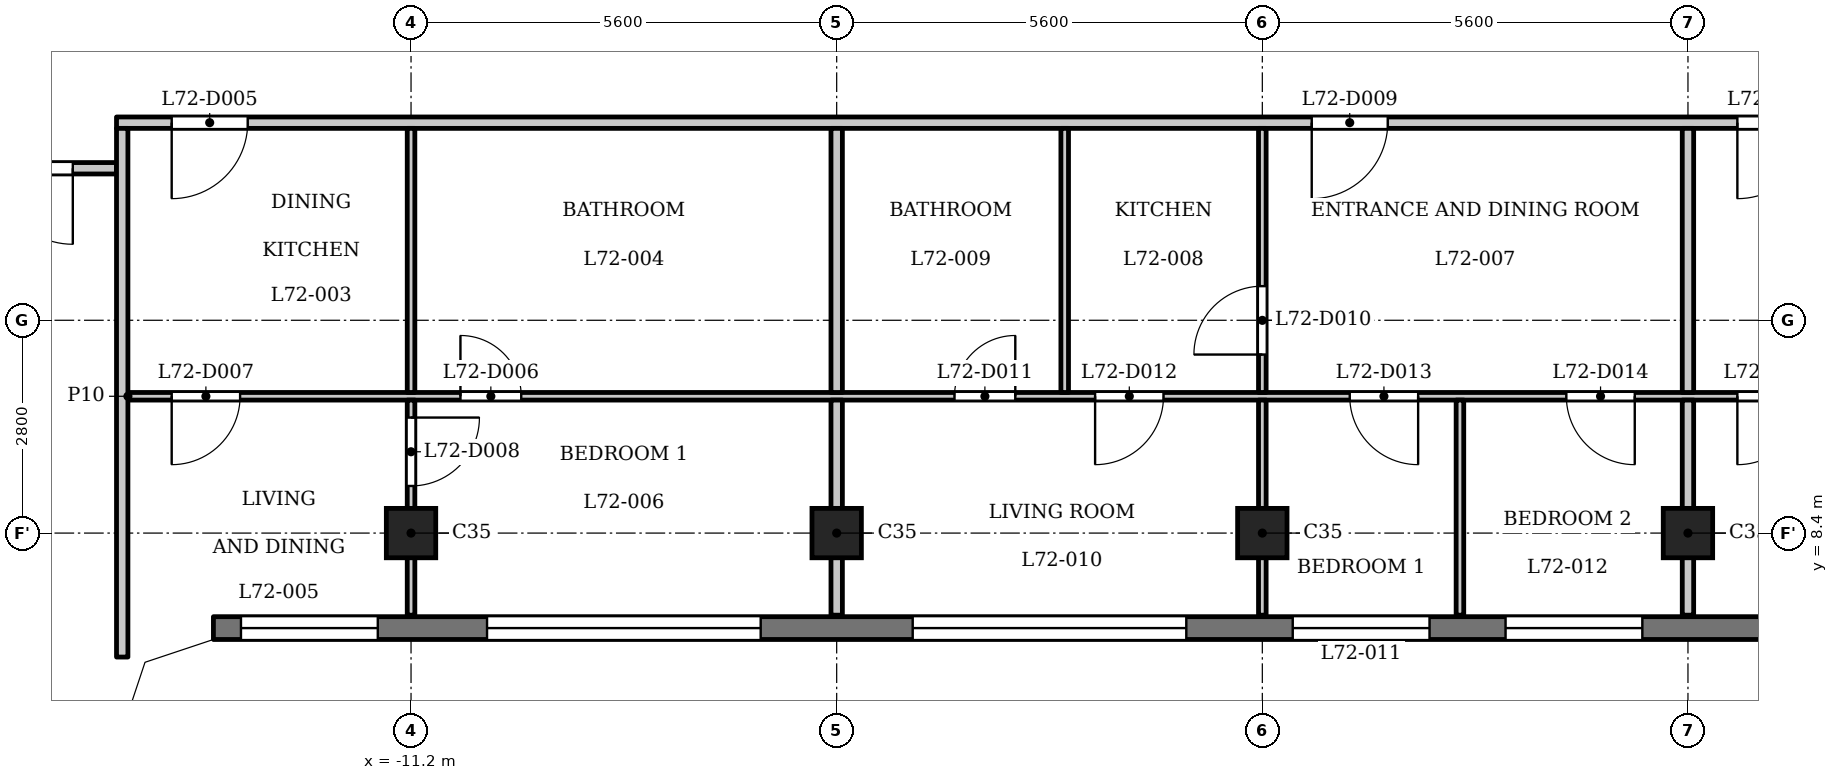
"""IFC4 building model, lengths in metres.
Left out: names, types, materials, properties, quantities, classifications, styles, units other than length and angle.
Written with IfcOpenShell. Run it as: python <this file> out.ifc"""

import sys

from ifc_helpers import new_model, si_unit, direction, frame, frame_2d, origin, origin_2d, place, context, subcontext, project, spatial, polyline, rectangle, outline, extrude, element, fill, save


model = new_model("IFC4")
c1 = context("Model", 3, precision=1e-05, world=origin(), true_north=direction((0.0, 1.0)))
c2 = subcontext(c1, "Body", "Model", "MODEL_VIEW")
j1 = project(units=[si_unit("LENGTHUNIT", "METRE"), si_unit("PLANEANGLEUNIT", "RADIAN")], contexts=[c1])
p1 = place(None, origin())
s1 = spatial("IfcSite", under=j1, at=p1, CompositionType="ELEMENT")
p2 = place(p1, origin())
s2 = spatial("IfcBuilding", under=s1, at=p2, CompositionType="ELEMENT")
p3 = place(p2, frame((0.0, 0.0, 276.7)))
s3 = spatial("IfcBuildingStorey", under=s2, at=p3, CompositionType="ELEMENT", Elevation=276.7)
for number, where, z_axis, x_axis in (
    (1, (-11.2, 8.4, 0.0), (0.0, 0.0, 1.0), (1.0, 0.0, 0.0)),
    (2, (-5.6, 8.4, 0.0), (0.0, 0.0, 1.0), (1.0, 0.0, 0.0)),
    (3, (0.0, 8.4, 0.0), (0.0, 0.0, 1.0), (1.0, 0.0, 0.0)),
    (4, (5.6, 8.4, 0.0), (0.0, 0.0, 1.0), (1.0, 0.0, 0.0)),
):
    element("IfcColumn", number, at=place(p3, frame(where, z_axis=z_axis, x_axis=x_axis)), inside=s3, PredefinedType="COLUMN", context=c2, shape_type="SweptSolid", body=[
        extrude(rectangle(XDim=0.65, YDim=0.65, at=origin_2d()), origin(), (0.0, 0.0, 1.0), 3.5),
    ])
p4 = place(p3, frame((-13.8, 7.15, 0.0), z_axis=(0.0, 0.0, 1.0), x_axis=(1.0, 0.0, 0.0)))
e5 = element("IfcWall", 5, at=p4, inside=s3, PredefinedType="SOLIDWALL", context=c2, shape_type="SweptSolid", body=[
    extrude(rectangle(XDim=27.6, YDim=0.3, at=frame_2d((13.8, 0.0))), origin(), (0.0, 0.0, 1.0), 3.2),
])
p5 = place(p4, frame((0.363, 0.0, 0.9)))
e6 = element("IfcOpeningElement", 6, at=p5, cuts=e5, PredefinedType="OPENING", context=c2, shape_type="SweptSolid", body=[
    extrude(rectangle(XDim=1.8, YDim=1.25, at=frame_2d((0.9, 0.625))), frame((0.0, 0.16, 0.0), z_axis=(0.0, -1.0, 0.0), x_axis=(1.0, 0.0, 0.0)), (0.0, 0.0, 1.0), 0.32),
])
p6 = place(p4, frame((3.6, 0.0, 1.2)))
e7 = element("IfcOpeningElement", 7, at=p6, cuts=e5, PredefinedType="OPENING", context=c2, shape_type="SweptSolid", body=[
    extrude(rectangle(XDim=3.6, YDim=0.95, at=frame_2d((1.8, 0.475))), frame((0.0, 0.16, 0.0), z_axis=(0.0, -1.0, 0.0), x_axis=(1.0, 0.0, 0.0)), (0.0, 0.0, 1.0), 0.32),
])
p7 = place(p4, frame((9.2, 0.0, 1.2)))
e8 = element("IfcOpeningElement", 8, at=p7, cuts=e5, PredefinedType="OPENING", context=c2, shape_type="SweptSolid", body=[
    extrude(rectangle(XDim=3.6, YDim=0.95, at=frame_2d((1.8, 0.475))), frame((0.0, 0.16, 0.0), z_axis=(0.0, -1.0, 0.0), x_axis=(1.0, 0.0, 0.0)), (0.0, 0.0, 1.0), 0.32),
])
p8 = place(p4, frame((14.2, 0.0, 0.9)))
e9 = element("IfcOpeningElement", 9, at=p8, cuts=e5, PredefinedType="OPENING", context=c2, shape_type="SweptSolid", body=[
    extrude(rectangle(XDim=1.8, YDim=1.25, at=frame_2d((0.9, 0.625))), frame((0.0, 0.16, 0.0), z_axis=(0.0, -1.0, 0.0), x_axis=(1.0, 0.0, 0.0)), (0.0, 0.0, 1.0), 0.32),
])
p9 = place(p4, frame((17.0, 0.0, 0.9)))
e10 = element("IfcOpeningElement", 10, at=p9, cuts=e5, PredefinedType="OPENING", context=c2, shape_type="SweptSolid", body=[
    extrude(rectangle(XDim=1.8, YDim=1.25, at=frame_2d((0.9, 0.625))), frame((0.0, 0.16, 0.0), z_axis=(0.0, -1.0, 0.0), x_axis=(1.0, 0.0, 0.0)), (0.0, 0.0, 1.0), 0.32),
])
p10 = place(p4, frame((20.4, 0.0, 1.2)))
e11 = element("IfcOpeningElement", 11, at=p10, cuts=e5, PredefinedType="OPENING", context=c2, shape_type="SweptSolid", body=[
    extrude(rectangle(XDim=3.6, YDim=0.95, at=frame_2d((1.8, 0.475))), frame((0.0, 0.16, 0.0), z_axis=(0.0, -1.0, 0.0), x_axis=(1.0, 0.0, 0.0)), (0.0, 0.0, 1.0), 0.32),
])
p11 = place(p4, frame((25.438, 0.0, 0.9)))
e12 = element("IfcOpeningElement", 12, at=p11, cuts=e5, PredefinedType="OPENING", context=c2, shape_type="SweptSolid", body=[
    extrude(rectangle(XDim=1.8, YDim=1.25, at=frame_2d((0.9, 0.625))), frame((0.0, 0.16, 0.0), z_axis=(0.0, -1.0, 0.0), x_axis=(1.0, 0.0, 0.0)), (0.0, 0.0, 1.0), 0.32),
])
p12 = place(p3, frame((-14.925, 10.2, 0.0), z_axis=(0.0, 0.0, 1.0), x_axis=(1.0, 0.0, 0.0)))
e13 = element("IfcWall", 13, at=p12, inside=s3, PredefinedType="PARTITIONING", context=c2, shape_type="SweptSolid", body=[
    extrude(rectangle(XDim=29.85, YDim=0.1, at=frame_2d((14.925, 0.0))), origin(), (0.0, 0.0, 1.0), 3.2),
])
p13 = place(p12, frame((4.375, 0.0, 0.0)))
e14 = element("IfcOpeningElement", 14, at=p13, cuts=e13, PredefinedType="OPENING", context=c2, shape_type="SweptSolid", body=[
    extrude(rectangle(XDim=0.8, YDim=2.1, at=frame_2d((0.4, 1.05))), frame((0.0, 0.06, 0.0), z_axis=(0.0, -1.0, 0.0), x_axis=(1.0, 0.0, 0.0)), (0.0, 0.0, 1.0), 0.12),
])
p14 = place(p12, frame((0.576, 0.0, 0.0)))
e15 = element("IfcOpeningElement", 15, at=p14, cuts=e13, PredefinedType="OPENING", context=c2, shape_type="SweptSolid", body=[
    extrude(rectangle(XDim=0.9, YDim=2.1, at=frame_2d((0.45, 1.05))), frame((0.0, 0.06, 0.0), z_axis=(0.0, -1.0, 0.0), x_axis=(1.0, 0.0, 0.0)), (0.0, 0.0, 1.0), 0.12),
])
p15 = place(p12, frame((10.875, 0.0, 0.0)))
e16 = element("IfcOpeningElement", 16, at=p15, cuts=e13, PredefinedType="OPENING", context=c2, shape_type="SweptSolid", body=[
    extrude(rectangle(XDim=0.8, YDim=2.1, at=frame_2d((0.4, 1.05))), frame((0.0, 0.06, 0.0), z_axis=(0.0, -1.0, 0.0), x_axis=(1.0, 0.0, 0.0)), (0.0, 0.0, 1.0), 0.12),
])
p16 = place(p12, frame((12.725, 0.0, 0.0)))
e17 = element("IfcOpeningElement", 17, at=p16, cuts=e13, PredefinedType="OPENING", context=c2, shape_type="SweptSolid", body=[
    extrude(rectangle(XDim=0.9, YDim=2.1, at=frame_2d((0.45, 1.05))), frame((0.0, 0.06, 0.0), z_axis=(0.0, -1.0, 0.0), x_axis=(1.0, 0.0, 0.0)), (0.0, 0.0, 1.0), 0.12),
])
p17 = place(p12, frame((16.075, 0.0, 0.0)))
e18 = element("IfcOpeningElement", 18, at=p17, cuts=e13, PredefinedType="OPENING", context=c2, shape_type="SweptSolid", body=[
    extrude(rectangle(XDim=0.9, YDim=2.1, at=frame_2d((0.45, 1.05))), frame((0.0, 0.06, 0.0), z_axis=(0.0, -1.0, 0.0), x_axis=(1.0, 0.0, 0.0)), (0.0, 0.0, 1.0), 0.12),
])
p18 = place(p12, frame((18.925, 0.0, 0.0)))
e19 = element("IfcOpeningElement", 19, at=p18, cuts=e13, PredefinedType="OPENING", context=c2, shape_type="SweptSolid", body=[
    extrude(rectangle(XDim=0.9, YDim=2.1, at=frame_2d((0.45, 1.05))), frame((0.0, 0.06, 0.0), z_axis=(0.0, -1.0, 0.0), x_axis=(1.0, 0.0, 0.0)), (0.0, 0.0, 1.0), 0.12),
])
p19 = place(p12, frame((26.724, 0.0, 0.0)))
e20 = element("IfcOpeningElement", 20, at=p19, cuts=e13, PredefinedType="OPENING", context=c2, shape_type="SweptSolid", body=[
    extrude(rectangle(XDim=0.8, YDim=2.1, at=frame_2d((0.4, 1.05))), frame((0.0, 0.06, 0.0), z_axis=(0.0, -1.0, 0.0), x_axis=(1.0, 0.0, 0.0)), (0.0, 0.0, 1.0), 0.12),
])
p20 = place(p12, frame((21.175, 0.0, 0.0)))
e21 = element("IfcOpeningElement", 21, at=p20, cuts=e13, PredefinedType="OPENING", context=c2, shape_type="SweptSolid", body=[
    extrude(rectangle(XDim=0.9, YDim=2.1, at=frame_2d((0.45, 1.05))), frame((0.0, 0.06, 0.0), z_axis=(0.0, -1.0, 0.0), x_axis=(1.0, 0.0, 0.0)), (0.0, 0.0, 1.0), 0.12),
])
p21 = place(p3, frame((-17.4, 13.2, 0.0), z_axis=(0.0, 0.0, 1.0), x_axis=(1.0, 0.0, 0.0)))
e22 = element("IfcWall", 22, at=p21, inside=s3, PredefinedType="PARTITIONING", context=c2, shape_type="SweptSolid", body=[
    extrude(rectangle(XDim=2.325, YDim=0.15, at=frame_2d((1.163, 0.0))), origin(), (0.0, 0.0, 1.0), 3.2),
])
p22 = place(p21, frame((0.75, 0.0, 0.0)))
e23 = element("IfcOpeningElement", 23, at=p22, cuts=e22, PredefinedType="OPENING", context=c2, shape_type="SweptSolid", body=[
    extrude(rectangle(XDim=1.0, YDim=2.1, at=frame_2d((0.5, 1.05))), frame((0.0, 0.085, 0.0), z_axis=(0.0, -1.0, 0.0), x_axis=(1.0, 0.0, 0.0)), (0.0, 0.0, 1.0), 0.17),
])
p23 = place(p3, frame((-15.075, 13.8, 0.0), z_axis=(0.0, 0.0, 1.0), x_axis=(1.0, 0.0, 0.0)))
e24 = element("IfcWall", 24, at=p23, inside=s3, PredefinedType="PARTITIONING", context=c2, shape_type="SweptSolid", body=[
    extrude(rectangle(XDim=30.15, YDim=0.15, at=frame_2d((15.075, 0.0))), origin(), (0.0, 0.0, 1.0), 3.2),
])
p24 = place(p23, frame((0.726, 0.0, 0.0)))
e25 = element("IfcOpeningElement", 25, at=p24, cuts=e24, PredefinedType="OPENING", context=c2, shape_type="SweptSolid", body=[
    extrude(rectangle(XDim=1.0, YDim=2.1, at=frame_2d((0.5, 1.05))), frame((0.0, 0.085, 0.0), z_axis=(0.0, -1.0, 0.0), x_axis=(1.0, 0.0, 0.0)), (0.0, 0.0, 1.0), 0.17),
])
p25 = place(p23, frame((15.725, 0.0, 0.0)))
e26 = element("IfcOpeningElement", 26, at=p25, cuts=e24, PredefinedType="OPENING", context=c2, shape_type="SweptSolid", body=[
    extrude(rectangle(XDim=1.0, YDim=2.1, at=frame_2d((0.5, 1.05))), frame((0.0, 0.085, 0.0), z_axis=(0.0, -1.0, 0.0), x_axis=(1.0, 0.0, 0.0)), (0.0, 0.0, 1.0), 0.17),
])
p26 = place(p23, frame((21.325, 0.0, 0.0)))
e27 = element("IfcOpeningElement", 27, at=p26, cuts=e24, PredefinedType="OPENING", context=c2, shape_type="SweptSolid", body=[
    extrude(rectangle(XDim=1.0, YDim=2.1, at=frame_2d((0.5, 1.05))), frame((0.0, 0.085, 0.0), z_axis=(0.0, -1.0, 0.0), x_axis=(1.0, 0.0, 0.0)), (0.0, 0.0, 1.0), 0.17),
])
p27 = place(p3, frame((-15.0, 6.769, 0.0), z_axis=(0.0, 0.0, 1.0), x_axis=(0.0, 1.0, 0.0)))
e28 = element("IfcWall", 28, at=p27, inside=s3, PredefinedType="PARTITIONING", context=c2, shape_type="SweptSolid", body=[
    extrude(rectangle(XDim=6.956, YDim=0.15, at=frame_2d((3.478, 0.0))), origin(), (0.0, 0.0, 1.0), 3.2),
])
p28 = place(p3, frame((-11.2, 7.32, 0.0), z_axis=(0.0, 0.0, 1.0), x_axis=(0.0, 1.0, 0.0)))
e29 = element("IfcWall", 29, at=p28, inside=s3, PredefinedType="PARTITIONING", context=c2, shape_type="SweptSolid", body=[
    extrude(rectangle(XDim=2.83, YDim=0.1, at=frame_2d((1.415, 0.0))), origin(), (0.0, 0.0, 1.0), 3.2),
])
p29 = place(p28, frame((1.7, 0.0, 0.0)))
e30 = element("IfcOpeningElement", 30, at=p29, cuts=e29, PredefinedType="OPENING", context=c2, shape_type="SweptSolid", body=[
    extrude(rectangle(XDim=0.9, YDim=2.1, at=frame_2d((0.45, 1.05))), frame((0.0, 0.06, 0.0), z_axis=(0.0, -1.0, 0.0), x_axis=(1.0, 0.0, 0.0)), (0.0, 0.0, 1.0), 0.12),
])
p30 = place(p3, frame((-11.2, 10.25, 0.0), z_axis=(0.0, 0.0, 1.0), x_axis=(0.0, 1.0, 0.0)))
e31 = element("IfcWall", 31, at=p30, inside=s3, PredefinedType="PARTITIONING", context=c2, shape_type="SweptSolid", body=[
    extrude(rectangle(XDim=3.475, YDim=0.1, at=frame_2d((1.738, 0.0))), origin(), (0.0, 0.0, 1.0), 3.2),
])
p31 = place(p3, frame((-5.6, 7.32, 0.0), z_axis=(0.0, 0.0, 1.0), x_axis=(0.0, 1.0, 0.0)))
e32 = element("IfcWall", 32, at=p31, inside=s3, PredefinedType="PARTITIONING", context=c2, shape_type="SweptSolid", body=[
    extrude(rectangle(XDim=2.83, YDim=0.15, at=frame_2d((1.415, 0.0))), origin(), (0.0, 0.0, 1.0), 3.2),
])
p32 = place(p3, frame((-5.6, 10.25, 0.0), z_axis=(0.0, 0.0, 1.0), x_axis=(0.0, 1.0, 0.0)))
e33 = element("IfcWall", 33, at=p32, inside=s3, PredefinedType="PARTITIONING", context=c2, shape_type="SweptSolid", body=[
    extrude(rectangle(XDim=3.475, YDim=0.15, at=frame_2d((1.738, 0.0))), origin(), (0.0, 0.0, 1.0), 3.2),
])
p33 = place(p3, frame((-2.6, 10.25, 0.0), z_axis=(0.0, 0.0, 1.0), x_axis=(0.0, 1.0, 0.0)))
e34 = element("IfcWall", 34, at=p33, inside=s3, PredefinedType="PARTITIONING", context=c2, shape_type="SweptSolid", body=[
    extrude(rectangle(XDim=3.475, YDim=0.1, at=frame_2d((1.738, 0.0))), origin(), (0.0, 0.0, 1.0), 3.2),
])
p34 = place(p3, frame((0.0, 7.32, 0.0), z_axis=(0.0, 0.0, 1.0), x_axis=(0.0, 1.0, 0.0)))
e35 = element("IfcWall", 35, at=p34, inside=s3, PredefinedType="PARTITIONING", context=c2, shape_type="SweptSolid", body=[
    extrude(rectangle(XDim=2.83, YDim=0.1, at=frame_2d((1.415, 0.0))), origin(), (0.0, 0.0, 1.0), 3.2),
])
p35 = place(p3, frame((0.0, 10.25, 0.0), z_axis=(0.0, 0.0, 1.0), x_axis=(0.0, 1.0, 0.0)))
e36 = element("IfcWall", 36, at=p35, inside=s3, PredefinedType="PARTITIONING", context=c2, shape_type="SweptSolid", body=[
    extrude(rectangle(XDim=3.475, YDim=0.1, at=frame_2d((1.738, 0.0))), origin(), (0.0, 0.0, 1.0), 3.2),
])
p36 = place(p35, frame((0.499, 0.0, 0.0)))
e37 = element("IfcOpeningElement", 37, at=p36, cuts=e36, PredefinedType="OPENING", context=c2, shape_type="SweptSolid", body=[
    extrude(rectangle(XDim=0.9, YDim=2.1, at=frame_2d((0.45, 1.05))), frame((0.0, 0.06, 0.0), z_axis=(0.0, -1.0, 0.0), x_axis=(1.0, 0.0, 0.0)), (0.0, 0.0, 1.0), 0.12),
])
p37 = place(p3, frame((2.6, 7.32, 0.0), z_axis=(0.0, 0.0, 1.0), x_axis=(0.0, 1.0, 0.0)))
e38 = element("IfcWall", 38, at=p37, inside=s3, PredefinedType="PARTITIONING", context=c2, shape_type="SweptSolid", body=[
    extrude(rectangle(XDim=2.83, YDim=0.1, at=frame_2d((1.415, 0.0))), origin(), (0.0, 0.0, 1.0), 3.2),
])
p38 = place(p3, frame((5.6, 7.32, 0.0), z_axis=(0.0, 0.0, 1.0), x_axis=(0.0, 1.0, 0.0)))
e39 = element("IfcWall", 39, at=p38, inside=s3, PredefinedType="PARTITIONING", context=c2, shape_type="SweptSolid", body=[
    extrude(rectangle(XDim=2.83, YDim=0.15, at=frame_2d((1.415, 0.0))), origin(), (0.0, 0.0, 1.0), 3.2),
])
p39 = place(p3, frame((5.6, 10.25, 0.0), z_axis=(0.0, 0.0, 1.0), x_axis=(0.0, 1.0, 0.0)))
e40 = element("IfcWall", 40, at=p39, inside=s3, PredefinedType="PARTITIONING", context=c2, shape_type="SweptSolid", body=[
    extrude(rectangle(XDim=3.475, YDim=0.15, at=frame_2d((1.738, 0.0))), origin(), (0.0, 0.0, 1.0), 3.2),
])
p40 = place(p3, origin())
e41 = element("IfcWall", 41, at=p40, inside=s3, PredefinedType="SOLIDWALL", context=c2, shape_type="SweptSolid", body=[
    extrude(outline(polyline([(-13.849, 7.3), (-14.937, 6.937), (-15.3, 5.849), (-15.3, 5.8), (-15.0, 5.8), (-14.7, 6.7), (-13.8, 7.0), (-13.8, 7.3), (-13.849, 7.3)])), origin(), (0.0, 0.0, 1.0), 3.2),
])
p41 = place(p22, origin())
e42 = element("IfcDoor", 42, at=p41, inside=s3, OperationType="SINGLE_SWING_RIGHT", PredefinedType="DOOR", context=c2, shape_type="SweptSolid", body=[
    extrude(rectangle(XDim=1.0, YDim=2.1, at=frame_2d((0.5, 1.05))), frame((0.0, 0.025, 0.0), z_axis=(0.0, -1.0, 0.0), x_axis=(1.0, 0.0, 0.0)), (0.0, 0.0, 1.0), 0.05),
])
fill(e23, e42)
p42 = place(p24, origin())
e43 = element("IfcDoor", 43, at=p42, inside=s3, OperationType="SINGLE_SWING_LEFT", PredefinedType="DOOR", context=c2, shape_type="SweptSolid", body=[
    extrude(rectangle(XDim=1.0, YDim=2.1, at=frame_2d((0.5, 1.05))), frame((0.0, 0.025, 0.0), z_axis=(0.0, -1.0, 0.0), x_axis=(1.0, 0.0, 0.0)), (0.0, 0.0, 1.0), 0.05),
])
fill(e25, e43)
p43 = place(p13, origin())
e44 = element("IfcDoor", 44, at=p43, inside=s3, OperationType="SINGLE_SWING_RIGHT", PredefinedType="DOOR", context=c2, shape_type="SweptSolid", body=[
    extrude(rectangle(XDim=0.8, YDim=2.1, at=frame_2d((0.4, 1.05))), frame((0.0, 0.025, 0.0), z_axis=(0.0, -1.0, 0.0), x_axis=(1.0, 0.0, 0.0)), (0.0, 0.0, 1.0), 0.05),
])
fill(e14, e44)
p44 = place(p14, origin())
e45 = element("IfcDoor", 45, at=p44, inside=s3, OperationType="SINGLE_SWING_LEFT", PredefinedType="DOOR", context=c2, shape_type="SweptSolid", body=[
    extrude(rectangle(XDim=0.9, YDim=2.1, at=frame_2d((0.45, 1.05))), frame((0.0, 0.025, 0.0), z_axis=(0.0, -1.0, 0.0), x_axis=(1.0, 0.0, 0.0)), (0.0, 0.0, 1.0), 0.05),
])
fill(e15, e45)
p45 = place(p29, origin())
e46 = element("IfcDoor", 46, at=p45, inside=s3, OperationType="SINGLE_SWING_RIGHT", PredefinedType="DOOR", context=c2, shape_type="SweptSolid", body=[
    extrude(rectangle(XDim=0.9, YDim=2.1, at=frame_2d((0.45, 1.05))), frame((0.0, 0.025, 0.0), z_axis=(0.0, -1.0, 0.0), x_axis=(1.0, 0.0, 0.0)), (0.0, 0.0, 1.0), 0.05),
])
fill(e30, e46)
p46 = place(p25, origin())
e47 = element("IfcDoor", 47, at=p46, inside=s3, OperationType="SINGLE_SWING_LEFT", PredefinedType="DOOR", context=c2, shape_type="SweptSolid", body=[
    extrude(rectangle(XDim=1.0, YDim=2.1, at=frame_2d((0.5, 1.05))), frame((0.0, 0.025, 0.0), z_axis=(0.0, -1.0, 0.0), x_axis=(1.0, 0.0, 0.0)), (0.0, 0.0, 1.0), 0.05),
])
fill(e26, e47)
p47 = place(p36, origin())
e48 = element("IfcDoor", 48, at=p47, inside=s3, OperationType="SINGLE_SWING_RIGHT", PredefinedType="DOOR", context=c2, shape_type="SweptSolid", body=[
    extrude(rectangle(XDim=0.9, YDim=2.1, at=frame_2d((0.45, 1.05))), frame((0.0, 0.025, 0.0), z_axis=(0.0, -1.0, 0.0), x_axis=(1.0, 0.0, 0.0)), (0.0, 0.0, 1.0), 0.05),
])
fill(e37, e48)
p48 = place(p15, origin())
e49 = element("IfcDoor", 49, at=p48, inside=s3, OperationType="SINGLE_SWING_LEFT", PredefinedType="DOOR", context=c2, shape_type="SweptSolid", body=[
    extrude(rectangle(XDim=0.8, YDim=2.1, at=frame_2d((0.4, 1.05))), frame((0.0, 0.025, 0.0), z_axis=(0.0, -1.0, 0.0), x_axis=(1.0, 0.0, 0.0)), (0.0, 0.0, 1.0), 0.05),
])
fill(e16, e49)
p49 = place(p16, origin())
e50 = element("IfcDoor", 50, at=p49, inside=s3, OperationType="SINGLE_SWING_LEFT", PredefinedType="DOOR", context=c2, shape_type="SweptSolid", body=[
    extrude(rectangle(XDim=0.9, YDim=2.1, at=frame_2d((0.45, 1.05))), frame((0.0, 0.025, 0.0), z_axis=(0.0, -1.0, 0.0), x_axis=(1.0, 0.0, 0.0)), (0.0, 0.0, 1.0), 0.05),
])
fill(e17, e50)
p50 = place(p17, origin())
e51 = element("IfcDoor", 51, at=p50, inside=s3, OperationType="SINGLE_SWING_RIGHT", PredefinedType="DOOR", context=c2, shape_type="SweptSolid", body=[
    extrude(rectangle(XDim=0.9, YDim=2.1, at=frame_2d((0.45, 1.05))), frame((0.0, 0.025, 0.0), z_axis=(0.0, -1.0, 0.0), x_axis=(1.0, 0.0, 0.0)), (0.0, 0.0, 1.0), 0.05),
])
fill(e18, e51)
p51 = place(p18, origin())
e52 = element("IfcDoor", 52, at=p51, inside=s3, OperationType="SINGLE_SWING_RIGHT", PredefinedType="DOOR", context=c2, shape_type="SweptSolid", body=[
    extrude(rectangle(XDim=0.9, YDim=2.1, at=frame_2d((0.45, 1.05))), frame((0.0, 0.025, 0.0), z_axis=(0.0, -1.0, 0.0), x_axis=(1.0, 0.0, 0.0)), (0.0, 0.0, 1.0), 0.05),
])
fill(e19, e52)
p52 = place(p26, origin())
e53 = element("IfcDoor", 53, at=p52, inside=s3, OperationType="SINGLE_SWING_LEFT", PredefinedType="DOOR", context=c2, shape_type="SweptSolid", body=[
    extrude(rectangle(XDim=1.0, YDim=2.1, at=frame_2d((0.5, 1.05))), frame((0.0, 0.025, 0.0), z_axis=(0.0, -1.0, 0.0), x_axis=(1.0, 0.0, 0.0)), (0.0, 0.0, 1.0), 0.05),
])
fill(e27, e53)
p53 = place(p20, origin())
e54 = element("IfcDoor", 54, at=p53, inside=s3, OperationType="SINGLE_SWING_LEFT", PredefinedType="DOOR", context=c2, shape_type="SweptSolid", body=[
    extrude(rectangle(XDim=0.9, YDim=2.1, at=frame_2d((0.45, 1.05))), frame((0.0, 0.025, 0.0), z_axis=(0.0, -1.0, 0.0), x_axis=(1.0, 0.0, 0.0)), (0.0, 0.0, 1.0), 0.05),
])
fill(e21, e54)
p54 = place(p5, origin())
e55 = element("IfcWindow", 55, at=p54, inside=s3, PartitioningType="SINGLE_PANEL", PredefinedType="WINDOW", context=c2, shape_type="SweptSolid", body=[
    extrude(rectangle(XDim=1.8, YDim=1.25, at=frame_2d((0.9, 0.625))), frame((0.0, 0.03, 0.0), z_axis=(0.0, -1.0, 0.0), x_axis=(1.0, 0.0, 0.0)), (0.0, 0.0, 1.0), 0.06),
])
fill(e6, e55)
p55 = place(p6, origin())
e56 = element("IfcWindow", 56, at=p55, inside=s3, PartitioningType="SINGLE_PANEL", PredefinedType="WINDOW", context=c2, shape_type="SweptSolid", body=[
    extrude(rectangle(XDim=3.6, YDim=0.95, at=frame_2d((1.8, 0.475))), frame((0.0, 0.03, 0.0), z_axis=(0.0, -1.0, 0.0), x_axis=(1.0, 0.0, 0.0)), (0.0, 0.0, 1.0), 0.06),
])
fill(e7, e56)
p56 = place(p7, origin())
e57 = element("IfcWindow", 57, at=p56, inside=s3, PartitioningType="SINGLE_PANEL", PredefinedType="WINDOW", context=c2, shape_type="SweptSolid", body=[
    extrude(rectangle(XDim=3.6, YDim=0.95, at=frame_2d((1.8, 0.475))), frame((0.0, 0.03, 0.0), z_axis=(0.0, -1.0, 0.0), x_axis=(1.0, 0.0, 0.0)), (0.0, 0.0, 1.0), 0.06),
])
fill(e8, e57)
p57 = place(p8, origin())
e58 = element("IfcWindow", 58, at=p57, inside=s3, PartitioningType="SINGLE_PANEL", PredefinedType="WINDOW", context=c2, shape_type="SweptSolid", body=[
    extrude(rectangle(XDim=1.8, YDim=1.25, at=frame_2d((0.9, 0.625))), frame((0.0, 0.03, 0.0), z_axis=(0.0, -1.0, 0.0), x_axis=(1.0, 0.0, 0.0)), (0.0, 0.0, 1.0), 0.06),
])
fill(e9, e58)
p58 = place(p9, origin())
e59 = element("IfcWindow", 59, at=p58, inside=s3, PartitioningType="SINGLE_PANEL", PredefinedType="WINDOW", context=c2, shape_type="SweptSolid", body=[
    extrude(rectangle(XDim=1.8, YDim=1.25, at=frame_2d((0.9, 0.625))), frame((0.0, 0.03, 0.0), z_axis=(0.0, -1.0, 0.0), x_axis=(1.0, 0.0, 0.0)), (0.0, 0.0, 1.0), 0.06),
])
fill(e10, e59)
save(model, sys.argv[1])
